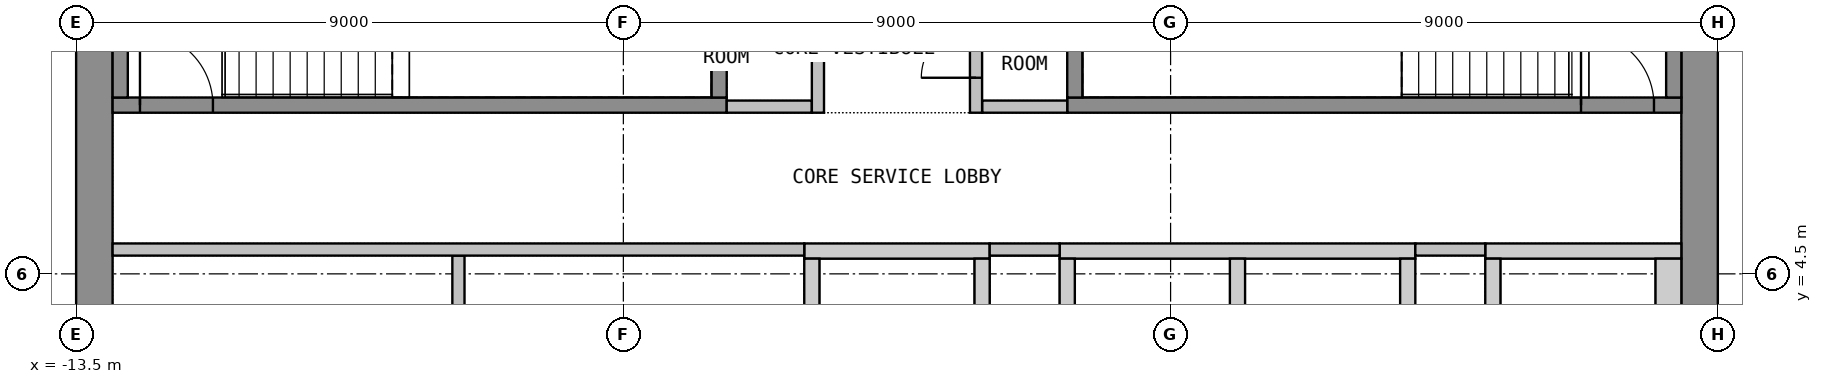
"""IFC4 building model, lengths in metres.
Left out: names, types, materials, properties, quantities, classifications, styles, units other than length and angle.
Written with IfcOpenShell. Run it as: python <this file> out.ifc"""

import sys

from ifc_helpers import new_model, si_unit, direction, frame, frame_2d, origin, place, context, subcontext, project, spatial, polyline, rectangle, outline, extrude, element, fill, save


model = new_model("IFC4")
c1 = context("Model", 3, precision=1e-05, world=origin(), true_north=direction((0.0, 1.0)))
c2 = subcontext(c1, "Body", "Model", "MODEL_VIEW")
j1 = project(units=[si_unit("LENGTHUNIT", "METRE"), si_unit("PLANEANGLEUNIT", "RADIAN")], contexts=[c1])
p1 = place(None, origin())
s1 = spatial("IfcSite", under=j1, at=p1, CompositionType="ELEMENT")
p2 = place(p1, origin())
s2 = spatial("IfcBuilding", under=s1, at=p2, CompositionType="ELEMENT")
p3 = place(p2, frame((0.0, 0.0, 286.5)))
s3 = spatial("IfcBuildingStorey", under=s2, at=p3, CompositionType="ELEMENT", Elevation=286.5)
p4 = place(p3, frame((-13.2, -10.65, 0.0), z_axis=(0.0, 0.0, 1.0), x_axis=(0.0, 1.0, 0.0)))
e1 = element("IfcWall", 1, at=p4, inside=s3, PredefinedType="SHEAR", context=c2, shape_type="SweptSolid", body=[
    extrude(rectangle(XDim=21.3, YDim=0.6, at=frame_2d((10.65, 0.0))), origin(), (0.0, 0.0, 1.0), 3.575),
])
p5 = place(p4, frame((9.45, 0.0, 0.0)))
e2 = element("IfcOpeningElement", 2, at=p5, cuts=e1, PredefinedType="OPENING", context=c2, shape_type="SweptSolid", body=[
    extrude(rectangle(XDim=2.4, YDim=2.1, at=frame_2d((1.2, 1.05))), frame((0.0, 0.31, 0.0), z_axis=(0.0, -1.0, 0.0), x_axis=(1.0, 0.0, 0.0)), (0.0, 0.0, 1.0), 0.62),
])
p6 = place(p3, frame((13.2, -10.65, 0.0), z_axis=(0.0, 0.0, 1.0), x_axis=(0.0, 1.0, 0.0)))
e3 = element("IfcWall", 3, at=p6, inside=s3, PredefinedType="SHEAR", context=c2, shape_type="SweptSolid", body=[
    extrude(rectangle(XDim=21.3, YDim=0.6, at=frame_2d((10.65, 0.0))), origin(), (0.0, 0.0, 1.0), 3.575),
])
p7 = place(p6, frame((9.45, 0.0, 0.0)))
e4 = element("IfcOpeningElement", 4, at=p7, cuts=e3, PredefinedType="OPENING", context=c2, shape_type="SweptSolid", body=[
    extrude(rectangle(XDim=2.4, YDim=2.1, at=frame_2d((1.2, 1.05))), frame((0.0, 0.31, 0.0), z_axis=(0.0, -1.0, 0.0), x_axis=(1.0, 0.0, 0.0)), (0.0, 0.0, 1.0), 0.62),
])
p8 = place(p3, origin())
e5 = element("IfcWall", 5, at=p8, inside=s3, PredefinedType="SHEAR", context=c2, shape_type="SweptSolid", body=[
    extrude(outline(polyline([(-1.525, 4.75), (1.525, 4.75), (1.525, 5.0), (-1.525, 5.0), (-1.525, 4.75)])), origin(), (0.0, 0.0, 1.0), 3.575),
])
p9 = place(p3, origin())
e6 = element("IfcWall", 6, at=p9, inside=s3, PredefinedType="SHEAR", context=c2, shape_type="SweptSolid", body=[
    extrude(outline(polyline([(2.675, 4.75), (8.525, 4.75), (8.525, 5.0), (2.675, 5.0), (2.675, 4.75)])), origin(), (0.0, 0.0, 1.0), 3.575),
])
p10 = place(p3, origin())
e7 = element("IfcWall", 7, at=p10, inside=s3, PredefinedType="SHEAR", context=c2, shape_type="SweptSolid", body=[
    extrude(outline(polyline([(9.675, 4.75), (12.9, 4.75), (12.9, 5.0), (9.675, 5.0), (9.675, 4.75)])), origin(), (0.0, 0.0, 1.0), 3.575),
])
p11 = place(p3, origin())
e8 = element("IfcWall", 8, at=p11, inside=s3, PredefinedType="SHEAR", context=c2, shape_type="SweptSolid", body=[
    extrude(outline(polyline([(-1.525, 2.05), (-1.275, 2.05), (-1.275, 4.75), (-1.525, 4.75), (-1.525, 2.05)])), origin(), (0.0, 0.0, 1.0), 3.575),
])
p12 = place(p3, origin())
e9 = element("IfcWall", 9, at=p12, inside=s3, PredefinedType="SHEAR", context=c2, shape_type="SweptSolid", body=[
    extrude(outline(polyline([(1.275, 2.05), (1.525, 2.05), (1.525, 4.75), (1.275, 4.75), (1.275, 2.05)])), origin(), (0.0, 0.0, 1.0), 3.575),
])
p13 = place(p3, origin())
e10 = element("IfcWall", 10, at=p13, inside=s3, PredefinedType="SHEAR", context=c2, shape_type="SweptSolid", body=[
    extrude(outline(polyline([(2.675, 2.05), (2.925, 2.05), (2.925, 4.75), (2.675, 4.75), (2.675, 2.05)])), origin(), (0.0, 0.0, 1.0), 3.575),
])
p14 = place(p3, origin())
e11 = element("IfcWall", 11, at=p14, inside=s3, PredefinedType="SHEAR", context=c2, shape_type="SweptSolid", body=[
    extrude(outline(polyline([(5.475, 2.05), (5.725, 2.05), (5.725, 4.75), (5.475, 4.75), (5.475, 2.05)])), origin(), (0.0, 0.0, 1.0), 3.575),
])
p15 = place(p3, origin())
e12 = element("IfcWall", 12, at=p15, inside=s3, PredefinedType="SHEAR", context=c2, shape_type="SweptSolid", body=[
    extrude(outline(polyline([(8.275, 2.05), (8.525, 2.05), (8.525, 4.75), (8.275, 4.75), (8.275, 2.05)])), origin(), (0.0, 0.0, 1.0), 3.575),
])
p16 = place(p3, origin())
e13 = element("IfcWall", 13, at=p16, inside=s3, PredefinedType="SHEAR", context=c2, shape_type="SweptSolid", body=[
    extrude(outline(polyline([(9.675, 2.05), (9.925, 2.05), (9.925, 4.75), (9.675, 4.75), (9.675, 2.05)])), origin(), (0.0, 0.0, 1.0), 3.575),
])
p17 = place(p3, origin())
e14 = element("IfcWall", 14, at=p17, inside=s3, PredefinedType="SHEAR", context=c2, shape_type="SweptSolid", body=[
    extrude(outline(polyline([(12.475, 2.05), (12.9, 2.05), (12.9, 4.75), (12.475, 4.75), (12.475, 2.05)])), origin(), (0.0, 0.0, 1.0), 3.575),
])
p18 = place(p3, frame((-12.9, 7.275, 0.0), z_axis=(0.0, 0.0, 1.0), x_axis=(1.0, 0.0, 0.0)))
e15 = element("IfcWall", 15, at=p18, inside=s3, PredefinedType="SHEAR", context=c2, shape_type="SweptSolid", body=[
    extrude(rectangle(XDim=10.1, YDim=0.25, at=frame_2d((5.05, 0.0))), origin(), (0.0, 0.0, 1.0), 3.575),
])
p19 = place(p18, frame((0.45, 0.0, 0.0)))
e16 = element("IfcOpeningElement", 16, at=p19, cuts=e15, PredefinedType="OPENING", context=c2, shape_type="SweptSolid", body=[
    extrude(rectangle(XDim=1.2, YDim=2.1, at=frame_2d((0.6, 1.05))), frame((0.0, 0.135, 0.0), z_axis=(0.0, -1.0, 0.0), x_axis=(1.0, 0.0, 0.0)), (0.0, 0.0, 1.0), 0.27),
])
for number, where, z_axis, x_axis in (
    (17, (-12.775, 7.4, 0.0), (0.0, 0.0, 1.0), (0.0, 1.0, 0.0)),
    (18, (-2.925, 7.4, 0.0), (0.0, 0.0, 1.0), (0.0, 1.0, 0.0)),
):
    element("IfcWall", number, at=place(p3, frame(where, z_axis=z_axis, x_axis=x_axis)), inside=s3, PredefinedType="SHEAR", context=c2, shape_type="SweptSolid", body=[
        extrude(rectangle(XDim=3.25, YDim=0.25, at=frame_2d((1.625, 0.0))), origin(), (0.0, 0.0, 1.0), 3.575),
    ])
p20 = place(p3, frame((2.8, 7.275, 0.0), z_axis=(0.0, 0.0, 1.0), x_axis=(1.0, 0.0, 0.0)))
e19 = element("IfcWall", 19, at=p20, inside=s3, PredefinedType="SHEAR", context=c2, shape_type="SweptSolid", body=[
    extrude(rectangle(XDim=10.1, YDim=0.25, at=frame_2d((5.05, 0.0))), origin(), (0.0, 0.0, 1.0), 3.575),
])
p21 = place(p20, frame((8.45, 0.0, 0.0)))
e20 = element("IfcOpeningElement", 20, at=p21, cuts=e19, PredefinedType="OPENING", context=c2, shape_type="SweptSolid", body=[
    extrude(rectangle(XDim=1.2, YDim=2.1, at=frame_2d((0.6, 1.05))), frame((0.0, 0.135, 0.0), z_axis=(0.0, -1.0, 0.0), x_axis=(1.0, 0.0, 0.0)), (0.0, 0.0, 1.0), 0.27),
])
for number, where, z_axis, x_axis in (
    (21, (2.925, 7.4, 0.0), (0.0, 0.0, 1.0), (0.0, 1.0, 0.0)),
    (22, (12.775, 7.4, 0.0), (0.0, 0.0, 1.0), (0.0, 1.0, 0.0)),
):
    element("IfcWall", number, at=place(p3, frame(where, z_axis=z_axis, x_axis=x_axis)), inside=s3, PredefinedType="SHEAR", context=c2, shape_type="SweptSolid", body=[
        extrude(rectangle(XDim=3.25, YDim=0.25, at=frame_2d((1.625, 0.0))), origin(), (0.0, 0.0, 1.0), 3.575),
    ])
for number, where, z_axis, x_axis in (
    (23, (-2.8, 7.25, 0.0), (0.0, 0.0, 1.0), (1.0, 0.0, 0.0)),
    (24, (1.4, 7.25, 0.0), (0.0, 0.0, 1.0), (1.0, 0.0, 0.0)),
):
    element("IfcWall", number, at=place(p3, frame(where, z_axis=z_axis, x_axis=x_axis)), inside=s3, PredefinedType="PARTITIONING", context=c2, shape_type="SweptSolid", body=[
        extrude(rectangle(XDim=1.4, YDim=0.2, at=frame_2d((0.7, 0.0))), origin(), (0.0, 0.0, 1.0), 3.575),
    ])
p22 = place(p3, frame((-1.3, 7.15, 0.0), z_axis=(0.0, 0.0, 1.0), x_axis=(0.0, 1.0, 0.0)))
e25 = element("IfcWall", 25, at=p22, inside=s3, PredefinedType="PARTITIONING", context=c2, shape_type="SweptSolid", body=[
    extrude(rectangle(XDim=3.5, YDim=0.2, at=frame_2d((1.75, 0.0))), origin(), (0.0, 0.0, 1.0), 3.575),
])
p23 = place(p22, frame((1.4, 0.0, 0.0)))
e26 = element("IfcOpeningElement", 26, at=p23, cuts=e25, PredefinedType="OPENING", context=c2, shape_type="SweptSolid", body=[
    extrude(rectangle(XDim=0.9, YDim=2.1, at=frame_2d((0.45, 1.05))), frame((0.0, 0.11, 0.0), z_axis=(0.0, -1.0, 0.0), x_axis=(1.0, 0.0, 0.0)), (0.0, 0.0, 1.0), 0.22),
])
p24 = place(p3, frame((1.3, 7.15, 0.0), z_axis=(0.0, 0.0, 1.0), x_axis=(0.0, 1.0, 0.0)))
e27 = element("IfcWall", 27, at=p24, inside=s3, PredefinedType="PARTITIONING", context=c2, shape_type="SweptSolid", body=[
    extrude(rectangle(XDim=3.5, YDim=0.2, at=frame_2d((1.75, 0.0))), origin(), (0.0, 0.0, 1.0), 3.575),
])
p25 = place(p24, frame((0.575, 0.0, 0.0)))
e28 = element("IfcOpeningElement", 28, at=p25, cuts=e27, PredefinedType="OPENING", context=c2, shape_type="SweptSolid", body=[
    extrude(rectangle(XDim=0.9, YDim=2.1, at=frame_2d((0.45, 1.05))), frame((0.0, 0.11, 0.0), z_axis=(0.0, -1.0, 0.0), x_axis=(1.0, 0.0, 0.0)), (0.0, 0.0, 1.0), 0.22),
])
p26 = place(p24, frame((2.225, 0.0, 0.0)))
e29 = element("IfcOpeningElement", 29, at=p26, cuts=e27, PredefinedType="OPENING", context=c2, shape_type="SweptSolid", body=[
    extrude(rectangle(XDim=0.9, YDim=2.1, at=frame_2d((0.45, 1.05))), frame((0.0, 0.11, 0.0), z_axis=(0.0, -1.0, 0.0), x_axis=(1.0, 0.0, 0.0)), (0.0, 0.0, 1.0), 0.22),
])
p27 = place(p3, frame((-7.212, 2.0, 0.0), z_axis=(0.0, 0.0, 1.0), x_axis=(0.0, 1.0, 0.0)))
e30 = element("IfcWall", 30, at=p27, inside=s3, PredefinedType="PARTITIONING", context=c2, shape_type="SweptSolid", body=[
    extrude(rectangle(XDim=2.8, YDim=0.2, at=frame_2d((1.4, 0.0))), origin(), (0.0, 0.0, 1.0), 3.575),
])
p28 = place(p3, frame((-12.9, 4.9, 0.0), z_axis=(0.0, 0.0, 1.0), x_axis=(1.0, 0.0, 0.0)))
e31 = element("IfcWall", 31, at=p28, inside=s3, PredefinedType="PARTITIONING", context=c2, shape_type="SweptSolid", body=[
    extrude(rectangle(XDim=11.375, YDim=0.2, at=frame_2d((5.688, 0.0))), origin(), (0.0, 0.0, 1.0), 3.575),
])
for number, where, z_axis, x_axis in (
    (32, (1.525, 4.9, 0.0), (0.0, 0.0, 1.0), (1.0, 0.0, 0.0)),
    (33, (8.525, 4.9, 0.0), (0.0, 0.0, 1.0), (1.0, 0.0, 0.0)),
):
    element("IfcWall", number, at=place(p3, frame(where, z_axis=z_axis, x_axis=x_axis)), inside=s3, PredefinedType="PARTITIONING", context=c2, shape_type="SweptSolid", body=[
        extrude(rectangle(XDim=1.15, YDim=0.2, at=frame_2d((0.575, 0.0))), origin(), (0.0, 0.0, 1.0), 3.575),
    ])
p29 = place(p19, origin())
e34 = element("IfcDoor", 34, at=p29, inside=s3, OperationType="SINGLE_SWING_LEFT", PredefinedType="DOOR", context=c2, shape_type="SweptSolid", body=[
    extrude(rectangle(XDim=1.2, YDim=2.1, at=frame_2d((0.6, 1.05))), frame((0.0, 0.025, 0.0), z_axis=(0.0, -1.0, 0.0), x_axis=(1.0, 0.0, 0.0)), (0.0, 0.0, 1.0), 0.05),
])
fill(e16, e34)
p30 = place(p21, origin())
e35 = element("IfcDoor", 35, at=p30, inside=s3, OperationType="SINGLE_SWING_LEFT", PredefinedType="DOOR", context=c2, shape_type="SweptSolid", body=[
    extrude(rectangle(XDim=1.2, YDim=2.1, at=frame_2d((0.6, 1.05))), frame((0.0, 0.025, 0.0), z_axis=(0.0, -1.0, 0.0), x_axis=(1.0, 0.0, 0.0)), (0.0, 0.0, 1.0), 0.05),
])
fill(e20, e35)
p31 = place(p25, origin())
e36 = element("IfcDoor", 36, at=p31, inside=s3, OperationType="SINGLE_SWING_LEFT", PredefinedType="DOOR", context=c2, shape_type="SweptSolid", body=[
    extrude(rectangle(XDim=0.9, YDim=2.1, at=frame_2d((0.45, 1.05))), frame((0.0, 0.025, 0.0), z_axis=(0.0, -1.0, 0.0), x_axis=(1.0, 0.0, 0.0)), (0.0, 0.0, 1.0), 0.05),
])
fill(e28, e36)
save(model, sys.argv[1])
